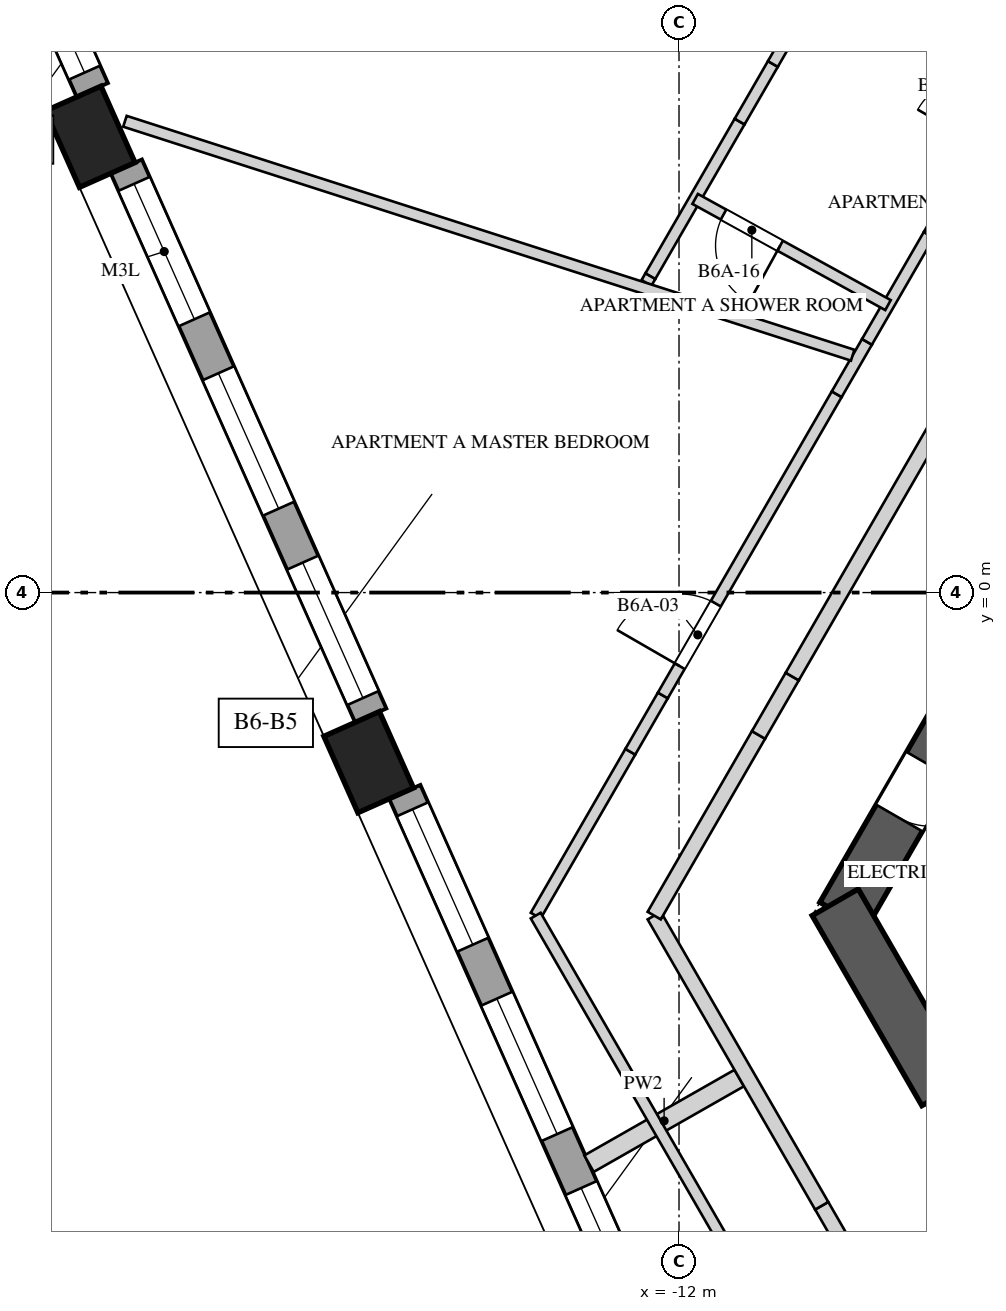
"""IFC4 building model, lengths in metres.
Left out: names, types, materials, properties, quantities, classifications, styles, units other than length and angle.
Written with IfcOpenShell. Run it as: python <this file> out.ifc"""

import sys

from ifc_helpers import new_model, si_unit, direction, frame, frame_2d, origin, origin_2d, place, context, subcontext, project, spatial, rectangle, extrude, element, fill, save


model = new_model("IFC4")
c1 = context("Model", 3, precision=1e-05, world=origin(), true_north=direction((0.0, 1.0)))
c2 = subcontext(c1, "Body", "Model", "MODEL_VIEW")
j1 = project(units=[si_unit("LENGTHUNIT", "METRE"), si_unit("PLANEANGLEUNIT", "RADIAN")], contexts=[c1])
p1 = place(None, origin())
s1 = spatial("IfcSite", under=j1, at=p1, CompositionType="ELEMENT")
p2 = place(p1, origin())
s2 = spatial("IfcBuilding", under=s1, at=p2, CompositionType="ELEMENT")
p3 = place(p2, frame((0.0, 0.0, 241.2)))
s3 = spatial("IfcBuildingStorey", under=s2, at=p3, CompositionType="ELEMENT", Elevation=241.2)
p4 = place(p3, frame((-1.241, 10.65, 0.0), z_axis=(0.0, 0.0, 1.0), x_axis=(-0.500003331888, -0.866023480109, 0.0)))
e1 = element("IfcWall", 1, at=p4, inside=s3, PredefinedType="SHEAR", context=c2, shape_type="SweptSolid", body=[
    extrude(rectangle(XDim=17.205, YDim=0.7, at=frame_2d((8.603, 0.0))), origin(), (0.0, 0.0, 1.0), 4.0),
])
p5 = place(p4, frame((6.808, 0.0, 0.0)))
e2 = element("IfcOpeningElement", 2, at=p5, cuts=e1, PredefinedType="OPENING", context=c2, shape_type="SweptSolid", body=[
    extrude(rectangle(XDim=1.0, YDim=2.4, at=frame_2d((0.5, 1.2))), frame((0.0, 0.36, 0.0), z_axis=(0.0, -1.0, 0.0), x_axis=(1.0, 0.0, 0.0)), (0.0, 0.0, 1.0), 0.72),
])
p6 = place(p4, frame((14.922, 0.0, 0.0)))
e3 = element("IfcOpeningElement", 3, at=p6, cuts=e1, PredefinedType="OPENING", context=c2, shape_type="SweptSolid", body=[
    extrude(rectangle(XDim=0.8, YDim=2.1, at=frame_2d((0.4, 1.05))), frame((0.0, 0.36, 0.0), z_axis=(0.0, -1.0, 0.0), x_axis=(1.0, 0.0, 0.0)), (0.0, 0.0, 1.0), 0.72),
])
p7 = place(p3, frame((-9.945, -4.075, 0.0), z_axis=(0.0, 0.0, 1.0), x_axis=(0.499995765644, -0.866027848477, 0.0)))
e4 = element("IfcWall", 4, at=p7, inside=s3, PredefinedType="SHEAR", context=c2, shape_type="SweptSolid", body=[
    extrude(rectangle(XDim=2.887, YDim=0.7, at=frame_2d((1.443, 0.0))), origin(), (0.0, 0.0, 1.0), 4.0),
])
for number, where, z_axis, x_axis in (
    (5, (-19.746, 5.997, 0.0), (0.0, 0.0, 1.0), (0.407, -0.914, 0.0)),
    (6, (-16.083, -2.231, 0.0), (0.0, 0.0, 1.0), (0.407, -0.914, 0.0)),
):
    element("IfcColumn", number, at=place(p3, frame(where, z_axis=z_axis, x_axis=x_axis)), inside=s3, PredefinedType="COLUMN", context=c2, shape_type="SweptSolid", body=[
        extrude(rectangle(XDim=1.1, YDim=0.8, at=origin_2d()), origin(), (0.0, 0.0, 1.0), 4.0),
    ])
p8 = place(p3, frame((-20.716, 8.851, 0.0), z_axis=(0.0, 0.0, 1.0), x_axis=(0.406821962592, -0.913507466172, 0.0)))
e7 = element("IfcWall", 7, at=p8, inside=s3, PredefinedType="SOLIDWALL", context=c2, shape_type="SweptSolid", body=[
    extrude(rectangle(XDim=2.452, YDim=0.45, at=frame_2d((1.226, 0.0))), origin(), (0.0, 0.0, 1.0), 3.3),
])
p9 = place(p8, frame((0.251, 0.0, 0.4)))
e8 = element("IfcOpeningElement", 8, at=p9, cuts=e7, PredefinedType="OPENING", context=c2, shape_type="SweptSolid", body=[
    extrude(rectangle(XDim=1.95, YDim=2.75, at=frame_2d((0.975, 1.375))), frame((0.0, 0.235, 0.0), z_axis=(0.0, -1.0, 0.0), x_axis=(1.0, 0.0, 0.0)), (0.0, 0.0, 1.0), 0.47),
])
p10 = place(p3, frame((-19.271, 5.606, 0.0), z_axis=(0.0, 0.0, 1.0), x_axis=(0.406760076741, -0.913535023942, 0.0)))
e9 = element("IfcWall", 9, at=p10, inside=s3, PredefinedType="SOLIDWALL", context=c2, shape_type="SweptSolid", body=[
    extrude(rectangle(XDim=7.906, YDim=0.45, at=frame_2d((3.953, 0.0))), origin(), (0.0, 0.0, 1.0), 3.3),
])
p11 = place(p10, frame((0.251, 0.0, 0.4)))
e10 = element("IfcOpeningElement", 10, at=p11, cuts=e9, PredefinedType="OPENING", context=c2, shape_type="SweptSolid", body=[
    extrude(rectangle(XDim=1.95, YDim=2.1, at=frame_2d((0.975, 1.05))), frame((0.0, 0.235, 0.0), z_axis=(0.0, -1.0, 0.0), x_axis=(1.0, 0.0, 0.0)), (0.0, 0.0, 1.0), 0.47),
])
p12 = place(p10, frame((2.978, 0.0, 0.4)))
e11 = element("IfcOpeningElement", 11, at=p12, cuts=e9, PredefinedType="OPENING", context=c2, shape_type="SweptSolid", body=[
    extrude(rectangle(XDim=1.95, YDim=2.75, at=frame_2d((0.975, 1.375))), frame((0.0, 0.235, 0.0), z_axis=(0.0, -1.0, 0.0), x_axis=(1.0, 0.0, 0.0)), (0.0, 0.0, 1.0), 0.47),
])
p13 = place(p10, frame((5.706, 0.0, 0.4)))
e12 = element("IfcOpeningElement", 12, at=p13, cuts=e9, PredefinedType="OPENING", context=c2, shape_type="SweptSolid", body=[
    extrude(rectangle(XDim=1.95, YDim=2.75, at=frame_2d((0.975, 1.375))), frame((0.0, 0.235, 0.0), z_axis=(0.0, -1.0, 0.0), x_axis=(1.0, 0.0, 0.0)), (0.0, 0.0, 1.0), 0.47),
])
p14 = place(p3, frame((-15.608, -2.622, 0.0), z_axis=(0.0, 0.0, 1.0), x_axis=(0.406748602972, -0.91354013266, 0.0)))
e13 = element("IfcWall", 13, at=p14, inside=s3, PredefinedType="SOLIDWALL", context=c2, shape_type="SweptSolid", body=[
    extrude(rectangle(XDim=7.907, YDim=0.45, at=frame_2d((3.953, 0.0))), origin(), (0.0, 0.0, 1.0), 3.3),
])
p15 = place(p14, frame((0.251, 0.0, 0.4)))
e14 = element("IfcOpeningElement", 14, at=p15, cuts=e13, PredefinedType="OPENING", context=c2, shape_type="SweptSolid", body=[
    extrude(rectangle(XDim=1.95, YDim=2.75, at=frame_2d((0.975, 1.375))), frame((0.0, 0.235, 0.0), z_axis=(0.0, -1.0, 0.0), x_axis=(1.0, 0.0, 0.0)), (0.0, 0.0, 1.0), 0.47),
])
p16 = place(p14, frame((2.978, 0.0, 0.4)))
e15 = element("IfcOpeningElement", 15, at=p16, cuts=e13, PredefinedType="OPENING", context=c2, shape_type="SweptSolid", body=[
    extrude(rectangle(XDim=1.95, YDim=2.75, at=frame_2d((0.975, 1.375))), frame((0.0, 0.235, 0.0), z_axis=(0.0, -1.0, 0.0), x_axis=(1.0, 0.0, 0.0)), (0.0, 0.0, 1.0), 0.47),
])
p17 = place(p14, frame((5.706, 0.0, 0.4)))
e16 = element("IfcOpeningElement", 16, at=p17, cuts=e13, PredefinedType="OPENING", context=c2, shape_type="SweptSolid", body=[
    extrude(rectangle(XDim=1.95, YDim=2.75, at=frame_2d((0.975, 1.375))), frame((0.0, 0.235, 0.0), z_axis=(0.0, -1.0, 0.0), x_axis=(1.0, 0.0, 0.0)), (0.0, 0.0, 1.0), 0.47),
])
p18 = place(p3, frame((-13.885, -4.25, 0.0), z_axis=(0.0, 0.0, 1.0), x_axis=(0.499999788377, 0.866025525965, 0.0)))
e17 = element("IfcWall", 17, at=p18, inside=s3, PredefinedType="PARTITIONING", context=c2, shape_type="SweptSolid", body=[
    extrude(rectangle(XDim=2.489, YDim=0.15, at=frame_2d((1.245, 0.0))), origin(), (0.0, 0.0, 1.0), 3.65),
])
p19 = place(p3, frame((-12.641, -2.094, 0.0), z_axis=(0.0, 0.0, 1.0), x_axis=(0.500068347527, 0.865985939725, 0.0)))
e18 = element("IfcWall", 18, at=p19, inside=s3, PredefinedType="PARTITIONING", context=c2, shape_type="SweptSolid", body=[
    extrude(rectangle(XDim=0.855, YDim=0.15, at=frame_2d((0.428, 0.0))), origin(), (0.0, 0.0, 1.0), 2.95),
])
p20 = place(p3, frame((-12.213, -1.354, 0.0), z_axis=(0.0, 0.0, 1.0), x_axis=(0.500001111708, 0.866024761939, 0.0)))
e19 = element("IfcWall", 19, at=p20, inside=s3, PredefinedType="PARTITIONING", context=c2, shape_type="SweptSolid", body=[
    extrude(rectangle(XDim=4.576, YDim=0.15, at=frame_2d((2.288, 0.0))), origin(), (0.0, 0.0, 1.0), 3.65),
])
p21 = place(p20, frame((0.445, 0.0, 0.0)))
e20 = element("IfcOpeningElement", 20, at=p21, cuts=e19, PredefinedType="OPENING", context=c2, shape_type="SweptSolid", body=[
    extrude(rectangle(XDim=0.95, YDim=2.4, at=frame_2d((0.475, 1.2))), frame((0.0, 0.085, 0.0), z_axis=(0.0, -1.0, 0.0), x_axis=(1.0, 0.0, 0.0)), (0.0, 0.0, 1.0), 0.17),
])
p22 = place(p3, frame((-9.925, 2.609, 0.0), z_axis=(0.0, 0.0, 1.0), x_axis=(0.499802134818, 0.866139611167, 0.0)))
e21 = element("IfcWall", 21, at=p22, inside=s3, PredefinedType="PARTITIONING", context=c2, shape_type="SweptSolid", body=[
    extrude(rectangle(XDim=0.796, YDim=0.15, at=frame_2d((0.398, 0.0))), origin(), (0.0, 0.0, 1.0), 2.75),
])
p23 = place(p3, frame((-9.527, 3.298, 0.0), z_axis=(0.0, 0.0, 1.0), x_axis=(0.500094991843, 0.865970553272, 0.0)))
e22 = element("IfcWall", 22, at=p23, inside=s3, PredefinedType="PARTITIONING", context=c2, shape_type="SweptSolid", body=[
    extrude(rectangle(XDim=1.626, YDim=0.15, at=frame_2d((0.813, 0.0))), origin(), (0.0, 0.0, 1.0), 3.65),
])
p24 = place(p3, frame((-8.714, 4.707, 0.0), z_axis=(0.0, 0.0, 1.0), x_axis=(0.499859285417, 0.866106630146, 0.0)))
e23 = element("IfcWall", 23, at=p24, inside=s3, PredefinedType="PARTITIONING", context=c2, shape_type="SweptSolid", body=[
    extrude(rectangle(XDim=0.875, YDim=0.15, at=frame_2d((0.438, 0.0))), origin(), (0.0, 0.0, 1.0), 2.55),
])
p25 = place(p3, frame((-12.428, 4.074, 0.0), z_axis=(0.0, 0.0, 1.0), x_axis=(0.500943559977, 0.865479953388, 0.0)))
e24 = element("IfcWall", 24, at=p25, inside=s3, PredefinedType="PARTITIONING", context=c2, shape_type="SweptSolid", body=[
    extrude(rectangle(XDim=0.104, YDim=0.15, at=frame_2d((0.052, 0.0))), origin(), (0.0, 0.0, 1.0), 2.75),
])
p26 = place(p3, frame((-12.376, 4.164, 0.0), z_axis=(0.0, 0.0, 1.0), x_axis=(0.499998569178, 0.866026229868, 0.0)))
e25 = element("IfcWall", 25, at=p26, inside=s3, PredefinedType="PARTITIONING", context=c2, shape_type="SweptSolid", body=[
    extrude(rectangle(XDim=2.347, YDim=0.15, at=frame_2d((1.174, 0.0))), origin(), (0.0, 0.0, 1.0), 3.65),
])
p27 = place(p3, frame((-11.203, 6.196, 0.0), z_axis=(0.0, 0.0, 1.0), x_axis=(0.499980071345, 0.866036909293, 0.0)))
e26 = element("IfcWall", 26, at=p27, inside=s3, PredefinedType="PARTITIONING", context=c2, shape_type="SweptSolid", body=[
    extrude(rectangle(XDim=0.875, YDim=0.15, at=frame_2d((0.438, 0.0))), origin(), (0.0, 0.0, 1.0), 2.55),
])
p28 = place(p3, frame((-10.765, 6.954, 0.0), z_axis=(0.0, 0.0, 1.0), x_axis=(0.499841962787, 0.866116627388, 0.0)))
e27 = element("IfcWall", 27, at=p28, inside=s3, PredefinedType="PARTITIONING", context=c2, shape_type="SweptSolid", body=[
    extrude(rectangle(XDim=0.943, YDim=0.15, at=frame_2d((0.472, 0.0))), origin(), (0.0, 0.0, 1.0), 3.65),
])
p29 = place(p3, frame((-11.208, -6.387, 0.0), z_axis=(0.0, 0.0, 1.0), x_axis=(-0.868850228445, -0.495075025153, 0.0)))
e28 = element("IfcWall", 28, at=p29, inside=s3, PredefinedType="SOLIDWALL", context=c2, shape_type="SweptSolid", body=[
    extrude(rectangle(XDim=2.274, YDim=0.25, at=frame_2d((1.137, 0.0))), origin(), (0.0, 0.0, 1.0), 3.65),
])
p30 = place(p3, frame((-11.165, -8.961, 0.0), z_axis=(0.0, 0.0, 1.0), x_axis=(-0.500009912158, 0.866019680922, 0.0)))
e29 = element("IfcWall", 29, at=p30, inside=s3, PredefinedType="PARTITIONING", context=c2, shape_type="SweptSolid", body=[
    extrude(rectangle(XDim=5.44, YDim=0.15, at=frame_2d((2.72, 0.0))), origin(), (0.0, 0.0, 1.0), 3.65),
])
p31 = place(p3, frame((-9.715, 3.123, 0.0), z_axis=(0.0, 0.0, 1.0), x_axis=(-0.952031844805, 0.305998964831, 0.0)))
e30 = element("IfcWall", 30, at=p31, inside=s3, PredefinedType="PARTITIONING", context=c2, shape_type="SweptSolid", body=[
    extrude(rectangle(XDim=10.057, YDim=0.15, at=frame_2d((5.028, 0.0))), origin(), (0.0, 0.0, 1.0), 2.75),
])
p32 = place(p3, frame((-9.25, 3.782, 0.0), z_axis=(0.0, 0.0, 1.0), x_axis=(-0.876043224435, 0.482232587991, 0.0)))
e31 = element("IfcWall", 31, at=p32, inside=s3, PredefinedType="PARTITIONING", context=c2, shape_type="SweptSolid", body=[
    extrude(rectangle(XDim=2.896, YDim=0.15, at=frame_2d((1.448, 0.0))), origin(), (0.0, 0.0, 1.0), 3.65),
])
p33 = place(p32, frame((1.62, 0.0, 0.0)))
e32 = element("IfcOpeningElement", 32, at=p33, cuts=e31, PredefinedType="OPENING", context=c2, shape_type="SweptSolid", body=[
    extrude(rectangle(XDim=0.85, YDim=2.4, at=frame_2d((0.425, 1.2))), frame((0.0, 0.085, 0.0), z_axis=(0.0, -1.0, 0.0), x_axis=(1.0, 0.0, 0.0)), (0.0, 0.0, 1.0), 0.17),
])
p34 = place(p3, frame((-9.844, -8.55, 0.0), z_axis=(0.0, 0.0, 1.0), x_axis=(-0.500000383388, 0.866025182435, 0.0)))
e33 = element("IfcWall", 33, at=p34, inside=s3, PredefinedType="SOLIDWALL", context=c2, shape_type="SweptSolid", body=[
    extrude(rectangle(XDim=0.558, YDim=0.2, at=frame_2d((0.279, 0.0))), origin(), (0.0, 0.0, 1.0), 2.95),
])
p35 = place(p3, frame((-10.123, -8.067, 0.0), z_axis=(0.0, 0.0, 1.0), x_axis=(-0.500005339912, 0.866022320763, 0.0)))
e34 = element("IfcWall", 34, at=p35, inside=s3, PredefinedType="SOLIDWALL", context=c2, shape_type="SweptSolid", body=[
    extrude(rectangle(XDim=4.408, YDim=0.2, at=frame_2d((2.204, 0.0))), origin(), (0.0, 0.0, 1.0), 3.65),
])
p36 = place(p3, frame((-12.326, -4.25, 0.0), z_axis=(0.0, 0.0, 1.0), x_axis=(0.499994514761, 0.866028570666, 0.0)))
e35 = element("IfcWall", 35, at=p36, inside=s3, PredefinedType="SOLIDWALL", context=c2, shape_type="SweptSolid", body=[
    extrude(rectangle(XDim=2.745, YDim=0.2, at=frame_2d((1.372, 0.0))), origin(), (0.0, 0.0, 1.0), 3.65),
])
p37 = place(p3, frame((-10.954, -1.873, 0.0), z_axis=(0.0, 0.0, 1.0), x_axis=(0.500016243463, 0.866016025414, 0.0)))
e36 = element("IfcWall", 36, at=p37, inside=s3, PredefinedType="SOLIDWALL", context=c2, shape_type="SweptSolid", body=[
    extrude(rectangle(XDim=0.887, YDim=0.2, at=frame_2d((0.444, 0.0))), origin(), (0.0, 0.0, 1.0), 2.95),
])
p38 = place(p3, frame((-10.51, -1.105, 0.0), z_axis=(0.0, 0.0, 1.0), x_axis=(0.499997905474, 0.866026613056, 0.0)))
e37 = element("IfcWall", 37, at=p38, inside=s3, PredefinedType="SOLIDWALL", context=c2, shape_type="SweptSolid", body=[
    extrude(rectangle(XDim=3.811, YDim=0.2, at=frame_2d((1.905, 0.0))), origin(), (0.0, 0.0, 1.0), 3.65),
])
p39 = place(p9, origin())
e38 = element("IfcWindow", 38, at=p39, inside=s3, PartitioningType="SINGLE_PANEL", PredefinedType="WINDOW", context=c2, shape_type="SweptSolid", body=[
    extrude(rectangle(XDim=1.95, YDim=2.75, at=frame_2d((0.975, 1.375))), frame((0.0, 0.03, 0.0), z_axis=(0.0, -1.0, 0.0), x_axis=(1.0, 0.0, 0.0)), (0.0, 0.0, 1.0), 0.06),
])
fill(e8, e38)
p40 = place(p11, origin())
e39 = element("IfcWindow", 39, at=p40, inside=s3, PartitioningType="SINGLE_PANEL", PredefinedType="WINDOW", context=c2, shape_type="SweptSolid", body=[
    extrude(rectangle(XDim=1.95, YDim=2.1, at=frame_2d((0.975, 1.05))), frame((0.0, 0.03, 0.0), z_axis=(0.0, -1.0, 0.0), x_axis=(1.0, 0.0, 0.0)), (0.0, 0.0, 1.0), 0.06),
])
fill(e10, e39)
p41 = place(p12, origin())
e40 = element("IfcWindow", 40, at=p41, inside=s3, PartitioningType="SINGLE_PANEL", PredefinedType="WINDOW", context=c2, shape_type="SweptSolid", body=[
    extrude(rectangle(XDim=1.95, YDim=2.75, at=frame_2d((0.975, 1.375))), frame((0.0, 0.03, 0.0), z_axis=(0.0, -1.0, 0.0), x_axis=(1.0, 0.0, 0.0)), (0.0, 0.0, 1.0), 0.06),
])
fill(e11, e40)
p42 = place(p13, origin())
e41 = element("IfcWindow", 41, at=p42, inside=s3, PartitioningType="SINGLE_PANEL", PredefinedType="WINDOW", context=c2, shape_type="SweptSolid", body=[
    extrude(rectangle(XDim=1.95, YDim=2.75, at=frame_2d((0.975, 1.375))), frame((0.0, 0.03, 0.0), z_axis=(0.0, -1.0, 0.0), x_axis=(1.0, 0.0, 0.0)), (0.0, 0.0, 1.0), 0.06),
])
fill(e12, e41)
p43 = place(p15, origin())
e42 = element("IfcWindow", 42, at=p43, inside=s3, PartitioningType="SINGLE_PANEL", PredefinedType="WINDOW", context=c2, shape_type="SweptSolid", body=[
    extrude(rectangle(XDim=1.95, YDim=2.75, at=frame_2d((0.975, 1.375))), frame((0.0, 0.03, 0.0), z_axis=(0.0, -1.0, 0.0), x_axis=(1.0, 0.0, 0.0)), (0.0, 0.0, 1.0), 0.06),
])
fill(e14, e42)
p44 = place(p16, origin())
e43 = element("IfcWindow", 43, at=p44, inside=s3, PartitioningType="SINGLE_PANEL", PredefinedType="WINDOW", context=c2, shape_type="SweptSolid", body=[
    extrude(rectangle(XDim=1.95, YDim=2.75, at=frame_2d((0.975, 1.375))), frame((0.0, 0.03, 0.0), z_axis=(0.0, -1.0, 0.0), x_axis=(1.0, 0.0, 0.0)), (0.0, 0.0, 1.0), 0.06),
])
fill(e15, e43)
p45 = place(p17, origin())
e44 = element("IfcWindow", 44, at=p45, inside=s3, PartitioningType="SINGLE_PANEL", PredefinedType="WINDOW", context=c2, shape_type="SweptSolid", body=[
    extrude(rectangle(XDim=1.95, YDim=2.75, at=frame_2d((0.975, 1.375))), frame((0.0, 0.03, 0.0), z_axis=(0.0, -1.0, 0.0), x_axis=(1.0, 0.0, 0.0)), (0.0, 0.0, 1.0), 0.06),
])
fill(e16, e44)
p46 = place(p6, origin())
e45 = element("IfcDoor", 45, at=p46, inside=s3, OperationType="SINGLE_SWING_LEFT", PredefinedType="DOOR", context=c2, shape_type="SweptSolid", body=[
    extrude(rectangle(XDim=0.8, YDim=2.1, at=frame_2d((0.4, 1.05))), frame((0.0, 0.025, 0.0), z_axis=(0.0, -1.0, 0.0), x_axis=(1.0, 0.0, 0.0)), (0.0, 0.0, 1.0), 0.05),
])
fill(e3, e45)
p47 = place(p21, origin())
e46 = element("IfcDoor", 46, at=p47, inside=s3, OperationType="SINGLE_SWING_LEFT", PredefinedType="DOOR", context=c2, shape_type="SweptSolid", body=[
    extrude(rectangle(XDim=0.95, YDim=2.4, at=frame_2d((0.475, 1.2))), frame((0.0, 0.025, 0.0), z_axis=(0.0, -1.0, 0.0), x_axis=(1.0, 0.0, 0.0)), (0.0, 0.0, 1.0), 0.05),
])
fill(e20, e46)
p48 = place(p33, origin())
e47 = element("IfcDoor", 47, at=p48, inside=s3, OperationType="SINGLE_SWING_RIGHT", PredefinedType="DOOR", context=c2, shape_type="SweptSolid", body=[
    extrude(rectangle(XDim=0.85, YDim=2.4, at=frame_2d((0.425, 1.2))), frame((0.0, 0.025, 0.0), z_axis=(0.0, -1.0, 0.0), x_axis=(1.0, 0.0, 0.0)), (0.0, 0.0, 1.0), 0.05),
])
fill(e32, e47)
save(model, sys.argv[1])
